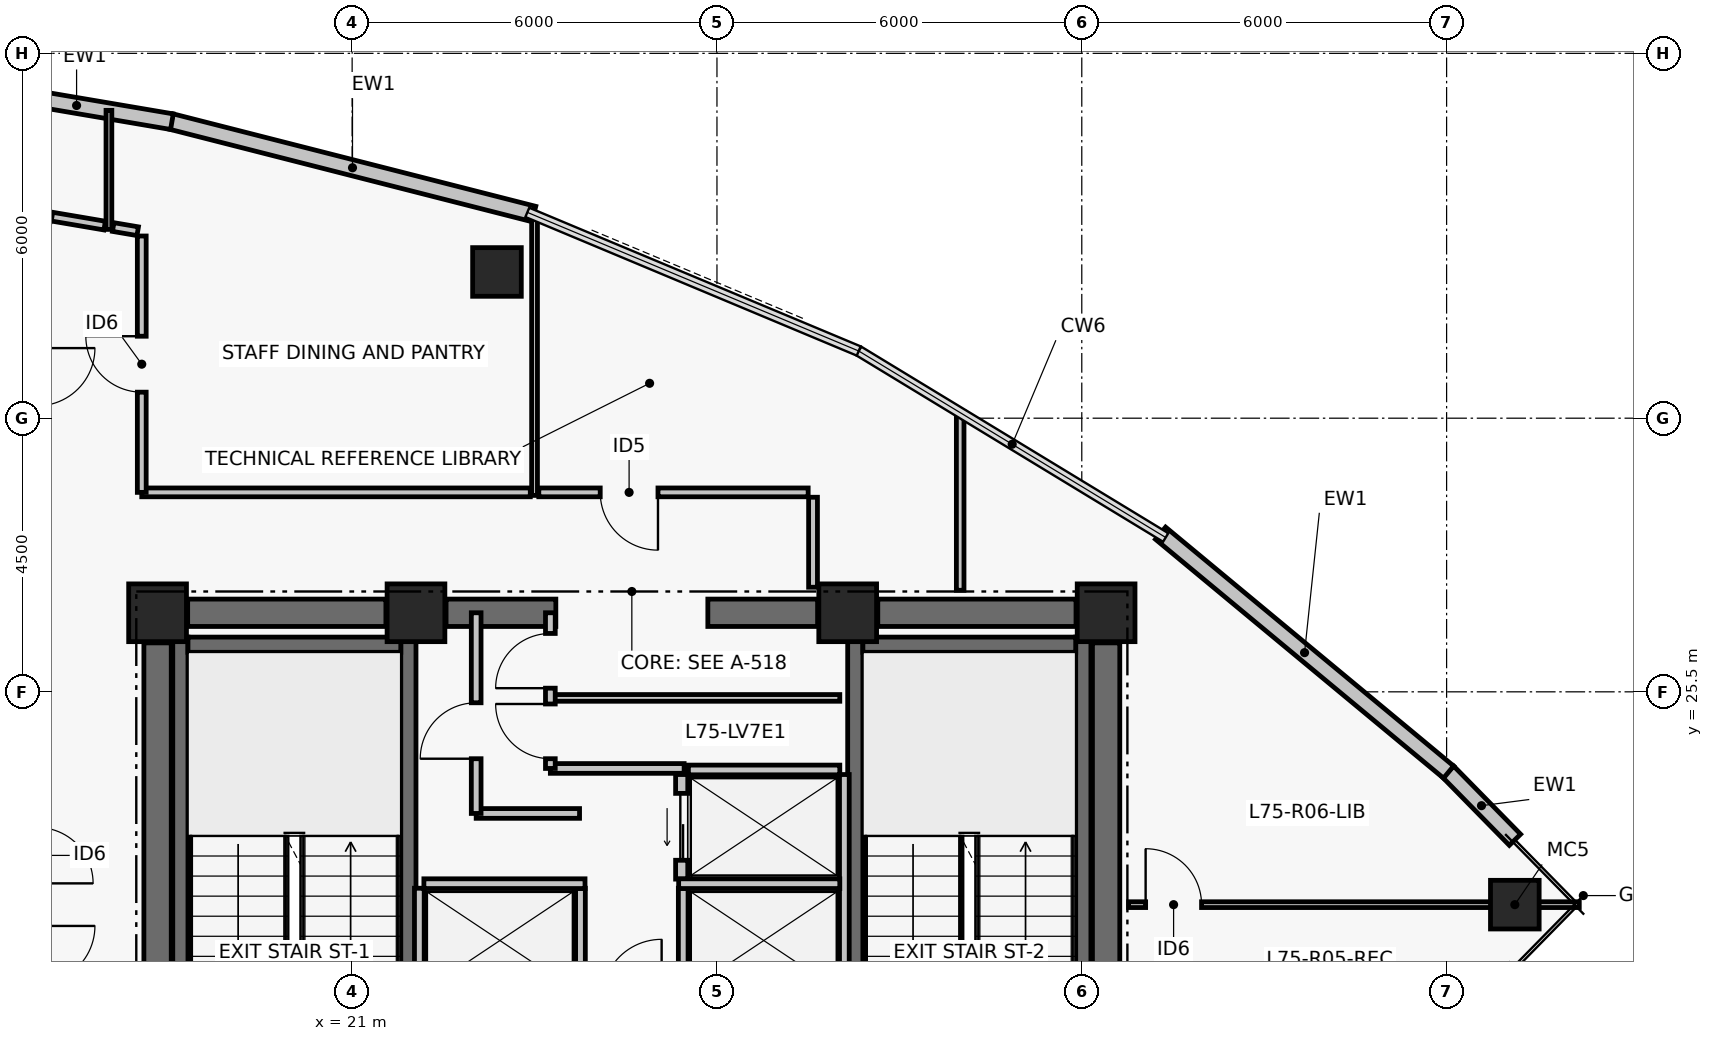
"""IFC4 building model, lengths in metres.
Left out: names, types, materials, properties, quantities, classifications, styles, units other than length and angle.
Written with IfcOpenShell. Run it as: python <this file> out.ifc"""

import sys

from ifc_helpers import new_model, si_unit, direction, frame, frame_2d, origin, origin_2d, place, context, subcontext, project, spatial, rectangle, hollow_rectangle, extrude, element, fill, save


model = new_model("IFC4")
c1 = context("Model", 3, precision=1e-05, world=origin(), true_north=direction((0.0, 1.0)))
c2 = subcontext(c1, "Body", "Model", "MODEL_VIEW")
j1 = project(units=[si_unit("LENGTHUNIT", "METRE"), si_unit("PLANEANGLEUNIT", "RADIAN")], contexts=[c1])
p1 = place(None, origin())
s1 = spatial("IfcSite", under=j1, at=p1, CompositionType="ELEMENT")
p2 = place(p1, origin())
s2 = spatial("IfcBuilding", under=s1, at=p2, CompositionType="ELEMENT")
p3 = place(p2, frame((0.0, 0.0, 295.5)))
s3 = spatial("IfcBuildingStorey", under=s2, at=p3, CompositionType="ELEMENT", Elevation=295.5)
for number, where, z_axis, x_axis in (
    (1, (17.8, 26.8, 0.0), (0.0, 0.0, 1.0), (1.0, 0.0, 0.0)),
    (2, (22.05, 26.8, 0.0), (0.0, 0.0, 1.0), (1.0, 0.0, 0.0)),
    (3, (29.15, 26.8, 0.0), (0.0, 0.0, 1.0), (1.0, 0.0, 0.0)),
    (4, (33.4, 26.8, 0.0), (0.0, 0.0, 1.0), (1.0, 0.0, 0.0)),
):
    element("IfcColumn", number, at=place(p3, frame(where, z_axis=z_axis, x_axis=x_axis)), inside=s3, PredefinedType="COLUMN", context=c2, shape_type="SweptSolid", body=[
        extrude(rectangle(XDim=0.95, YDim=0.95, at=origin_2d()), origin(), (0.0, 0.0, 1.0), 3.72),
    ])
p4 = place(p3, frame((18.295, 26.8, 0.0), z_axis=(0.0, 0.0, 1.0), x_axis=(1.0, 0.0, 0.0)))
e5 = element("IfcWall", 5, at=p4, inside=s3, PredefinedType="SHEAR", context=c2, shape_type="SweptSolid", body=[
    extrude(rectangle(XDim=3.26, YDim=0.45, at=frame_2d((1.63, 0.0))), origin(), (0.0, 0.0, 1.0), 3.44),
])
p5 = place(p3, frame((22.545, 26.8, 0.0), z_axis=(0.0, 0.0, 1.0), x_axis=(1.0, 0.0, 0.0)))
e6 = element("IfcWall", 6, at=p5, inside=s3, PredefinedType="SHEAR", context=c2, shape_type="SweptSolid", body=[
    extrude(rectangle(XDim=1.805, YDim=0.45, at=frame_2d((0.903, 0.0))), origin(), (0.0, 0.0, 1.0), 3.44),
])
p6 = place(p3, frame((26.85, 26.8, 0.0), z_axis=(0.0, 0.0, 1.0), x_axis=(1.0, 0.0, 0.0)))
e7 = element("IfcWall", 7, at=p6, inside=s3, PredefinedType="SHEAR", context=c2, shape_type="SweptSolid", body=[
    extrude(rectangle(XDim=1.805, YDim=0.45, at=frame_2d((0.902, 0.0))), origin(), (0.0, 0.0, 1.0), 3.44),
])
p7 = place(p3, frame((29.645, 26.8, 0.0), z_axis=(0.0, 0.0, 1.0), x_axis=(1.0, 0.0, 0.0)))
e8 = element("IfcWall", 8, at=p7, inside=s3, PredefinedType="SHEAR", context=c2, shape_type="SweptSolid", body=[
    extrude(rectangle(XDim=3.26, YDim=0.45, at=frame_2d((1.63, 0.0))), origin(), (0.0, 0.0, 1.0), 3.44),
])
for number, where, z_axis, x_axis in (
    (9, (17.8, 17.695, 0.0), (0.0, 0.0, 1.0), (0.0, 1.0, 0.0)),
    (10, (33.4, 17.695, 0.0), (0.0, 0.0, 1.0), (0.0, 1.0, 0.0)),
):
    element("IfcWall", number, at=place(p3, frame(where, z_axis=z_axis, x_axis=x_axis)), inside=s3, PredefinedType="SHEAR", context=c2, shape_type="SweptSolid", body=[
        extrude(rectangle(XDim=8.61, YDim=0.45, at=frame_2d((4.305, 0.0))), origin(), (0.0, 0.0, 1.0), 3.44),
    ])
p8 = place(p3, frame((18.175, 17.6, 0.0), z_axis=(0.0, 0.0, 1.0), x_axis=(0.0, 1.0, 0.0)))
e11 = element("IfcWall", 11, at=p8, inside=s3, PredefinedType="SHEAR", context=c2, shape_type="SweptSolid", body=[
    extrude(rectangle(XDim=8.8, YDim=0.25, at=frame_2d((4.4, 0.0))), origin(), (0.0, 0.0, 1.0), 3.44),
])
p9 = place(p3, frame((21.925, 17.6, 0.0), z_axis=(0.0, 0.0, 1.0), x_axis=(0.0, 1.0, 0.0)))
e12 = element("IfcWall", 12, at=p9, inside=s3, PredefinedType="SHEAR", context=c2, shape_type="SweptSolid", body=[
    extrude(rectangle(XDim=8.8, YDim=0.25, at=frame_2d((4.4, 0.0))), origin(), (0.0, 0.0, 1.0), 3.44),
])
p10 = place(p9, frame((0.35, 0.0, 0.0)))
e13 = element("IfcOpeningElement", 13, at=p10, cuts=e12, PredefinedType="OPENING", context=c2, shape_type="SweptSolid", body=[
    extrude(rectangle(XDim=1.05, YDim=2.08, at=frame_2d((0.525, 1.04))), frame((0.0, 0.135, 0.0), z_axis=(0.0, -1.0, 0.0), x_axis=(1.0, 0.0, 0.0)), (0.0, 0.0, 1.0), 0.27),
])
p11 = place(p3, frame((18.3, 26.275, 0.0), z_axis=(0.0, 0.0, 1.0), x_axis=(1.0, 0.0, 0.0)))
e14 = element("IfcWall", 14, at=p11, inside=s3, PredefinedType="SHEAR", context=c2, shape_type="SweptSolid", body=[
    extrude(rectangle(XDim=3.5, YDim=0.25, at=frame_2d((1.75, 0.0))), origin(), (0.0, 0.0, 1.0), 3.44),
])
p12 = place(p3, frame((29.275, 17.6, 0.0), z_axis=(0.0, 0.0, 1.0), x_axis=(0.0, 1.0, 0.0)))
e15 = element("IfcWall", 15, at=p12, inside=s3, PredefinedType="SHEAR", context=c2, shape_type="SweptSolid", body=[
    extrude(rectangle(XDim=8.8, YDim=0.25, at=frame_2d((4.4, 0.0))), origin(), (0.0, 0.0, 1.0), 3.44),
])
p13 = place(p12, frame((0.35, 0.0, 0.0)))
e16 = element("IfcOpeningElement", 16, at=p13, cuts=e15, PredefinedType="OPENING", context=c2, shape_type="SweptSolid", body=[
    extrude(rectangle(XDim=1.05, YDim=2.08, at=frame_2d((0.525, 1.04))), frame((0.0, 0.135, 0.0), z_axis=(0.0, -1.0, 0.0), x_axis=(1.0, 0.0, 0.0)), (0.0, 0.0, 1.0), 0.27),
])
p14 = place(p3, frame((33.025, 17.6, 0.0), z_axis=(0.0, 0.0, 1.0), x_axis=(0.0, 1.0, 0.0)))
e17 = element("IfcWall", 17, at=p14, inside=s3, PredefinedType="SHEAR", context=c2, shape_type="SweptSolid", body=[
    extrude(rectangle(XDim=8.8, YDim=0.25, at=frame_2d((4.4, 0.0))), origin(), (0.0, 0.0, 1.0), 3.44),
])
p15 = place(p3, frame((29.4, 26.275, 0.0), z_axis=(0.0, 0.0, 1.0), x_axis=(1.0, 0.0, 0.0)))
e18 = element("IfcWall", 18, at=p15, inside=s3, PredefinedType="SHEAR", context=c2, shape_type="SweptSolid", body=[
    extrude(rectangle(XDim=3.5, YDim=0.25, at=frame_2d((1.75, 0.0))), origin(), (0.0, 0.0, 1.0), 3.44),
])
for number, where, z_axis, x_axis in (
    (19, (40.122, 22.0, 0.0), (0.0, 0.0, 1.0), (1.0, 0.0, 0.0)),
    (20, (23.382, 32.405, 0.0), (0.0, 0.0, 1.0), (1.0, 0.0, 0.0)),
):
    element("IfcColumn", number, at=place(p3, frame(where, z_axis=z_axis, x_axis=x_axis)), inside=s3, PredefinedType="COLUMN", context=c2, shape_type="SweptSolid", body=[
        extrude(hollow_rectangle(XDim=0.8, YDim=0.8, WallThickness=0.035, at=origin_2d()), origin(), (0.0, 0.0, 1.0), 3.72),
    ])
p16 = place(p3, frame((39.024, 24.188, 0.0), z_axis=(0.0, 0.0, 1.0), x_axis=(0.700470648387, -0.71368121087, 0.0)))
e21 = element("IfcWall", 21, at=p16, inside=s3, PredefinedType="PARTITIONING", context=c2, shape_type="SweptSolid", body=[
    extrude(rectangle(XDim=1.571, YDim=0.26, at=frame_2d((0.785, 0.0))), origin(), (0.0, 0.0, 1.0), 3.44),
])
p17 = place(p3, frame((34.295, 28.108, 0.0), z_axis=(0.0, 0.0, 1.0), x_axis=(0.769779830138, -0.638309496337, 0.0)))
e22 = element("IfcWall", 22, at=p17, inside=s3, PredefinedType="PARTITIONING", context=c2, shape_type="SweptSolid", body=[
    extrude(rectangle(XDim=6.154, YDim=0.26, at=frame_2d((3.077, 0.0))), origin(), (0.0, 0.0, 1.0), 3.44),
])
p18 = place(p3, frame((18.024, 34.879, 0.0), z_axis=(0.0, 0.0, 1.0), x_axis=(0.968988278672, -0.247106689096, 0.0)))
e23 = element("IfcWall", 23, at=p18, inside=s3, PredefinedType="PARTITIONING", context=c2, shape_type="SweptSolid", body=[
    extrude(rectangle(XDim=6.154, YDim=0.26, at=frame_2d((3.077, 0.0))), origin(), (0.0, 0.0, 1.0), 3.44),
])
p19 = place(p3, frame((14.9, 35.409, 0.0), z_axis=(0.0, 0.0, 1.0), x_axis=(0.985889432766, -0.167397808709, 0.0)))
e24 = element("IfcWall", 24, at=p19, inside=s3, PredefinedType="PARTITIONING", context=c2, shape_type="SweptSolid", body=[
    extrude(rectangle(XDim=3.181, YDim=0.26, at=frame_2d((1.59, 0.0))), origin(), (0.0, 0.0, 1.0), 3.44),
])
p20 = place(p3, frame((26.42, 22.42, 0.0), z_axis=(0.0, 0.0, 1.0), x_axis=(0.0, 1.0, 0.0)))
e25 = element("IfcWall", 25, at=p20, inside=s3, PredefinedType="PARTITIONING", context=c2, shape_type="SweptSolid", body=[
    extrude(rectangle(XDim=1.72, YDim=0.2, at=frame_2d((0.86, 0.0))), origin(), (0.0, 0.0, 1.0), 3.44),
])
p21 = place(p20, frame((0.31, 0.0, 0.0)))
e26 = element("IfcOpeningElement", 26, at=p21, cuts=e25, PredefinedType="OPENING", context=c2, shape_type="SweptSolid", body=[
    extrude(rectangle(XDim=1.1, YDim=2.08, at=frame_2d((0.55, 1.04))), frame((0.0, 0.11, 0.0), z_axis=(0.0, -1.0, 0.0), x_axis=(1.0, 0.0, 0.0)), (0.0, 0.0, 1.0), 0.22),
])
for number, where, z_axis, x_axis in (
    (27, (22.105, 20.56, 0.0), (0.0, 0.0, 1.0), (0.0, 1.0, 0.0)),
    (28, (24.755, 20.56, 0.0), (0.0, 0.0, 1.0), (0.0, 1.0, 0.0)),
):
    element("IfcWall", number, at=place(p3, frame(where, z_axis=z_axis, x_axis=x_axis)), inside=s3, PredefinedType="PARTITIONING", context=c2, shape_type="SweptSolid", body=[
        extrude(rectangle(XDim=1.71, YDim=0.16, at=frame_2d((0.855, 0.0))), origin(), (0.0, 0.0, 1.0), 3.44),
    ])
p22 = place(p3, frame((22.18, 22.345, 0.0), z_axis=(0.0, 0.0, 1.0), x_axis=(1.0, 0.0, 0.0)))
e29 = element("IfcWall", 29, at=p22, inside=s3, PredefinedType="PARTITIONING", context=c2, shape_type="SweptSolid", body=[
    extrude(rectangle(XDim=2.65, YDim=0.16, at=frame_2d((1.325, 0.0))), origin(), (0.0, 0.0, 1.0), 3.44),
])
p23 = place(p3, frame((29.095, 20.56, 0.0), z_axis=(0.0, 0.0, 1.0), x_axis=(0.0, 1.0, 0.0)))
e30 = element("IfcWall", 30, at=p23, inside=s3, PredefinedType="PARTITIONING", context=c2, shape_type="SweptSolid", body=[
    extrude(rectangle(XDim=3.58, YDim=0.16, at=frame_2d((1.79, 0.0))), origin(), (0.0, 0.0, 1.0), 3.44),
])
p24 = place(p3, frame((26.445, 20.56, 0.0), z_axis=(0.0, 0.0, 1.0), x_axis=(0.0, 1.0, 0.0)))
e31 = element("IfcWall", 31, at=p24, inside=s3, PredefinedType="PARTITIONING", context=c2, shape_type="SweptSolid", body=[
    extrude(rectangle(XDim=1.71, YDim=0.16, at=frame_2d((0.855, 0.0))), origin(), (0.0, 0.0, 1.0), 3.44),
])
p25 = place(p3, frame((26.37, 22.345, 0.0), z_axis=(0.0, 0.0, 1.0), x_axis=(1.0, 0.0, 0.0)))
e32 = element("IfcWall", 32, at=p25, inside=s3, PredefinedType="PARTITIONING", context=c2, shape_type="SweptSolid", body=[
    extrude(rectangle(XDim=2.65, YDim=0.16, at=frame_2d((1.325, 0.0))), origin(), (0.0, 0.0, 1.0), 3.44),
])
p26 = place(p3, frame((26.53, 24.215, 0.0), z_axis=(0.0, 0.0, 1.0), x_axis=(1.0, 0.0, 0.0)))
e33 = element("IfcWall", 33, at=p26, inside=s3, PredefinedType="PARTITIONING", context=c2, shape_type="SweptSolid", body=[
    extrude(rectangle(XDim=2.49, YDim=0.16, at=frame_2d((1.245, 0.0))), origin(), (0.0, 0.0, 1.0), 3.44),
])
p27 = place(p3, frame((23.04, 23.5, 0.0), z_axis=(0.0, 0.0, 1.0), x_axis=(1.0, 0.0, 0.0)))
e34 = element("IfcWall", 34, at=p27, inside=s3, PredefinedType="PARTITIONING", context=c2, shape_type="SweptSolid", body=[
    extrude(rectangle(XDim=1.7, YDim=0.16, at=frame_2d((0.85, 0.0))), origin(), (0.0, 0.0, 1.0), 3.44),
])
p28 = place(p3, frame((23.04, 23.5, 0.0), z_axis=(0.0, 0.0, 1.0), x_axis=(0.0, 1.0, 0.0)))
e35 = element("IfcWall", 35, at=p28, inside=s3, PredefinedType="PARTITIONING", context=c2, shape_type="SweptSolid", body=[
    extrude(rectangle(XDim=3.3, YDim=0.16, at=frame_2d((1.65, 0.0))), origin(), (0.0, 0.0, 1.0), 2.57),
])
p29 = place(p28, frame((0.9, 0.0, 0.0)))
e36 = element("IfcOpeningElement", 36, at=p29, cuts=e35, PredefinedType="OPENING", context=c2, shape_type="SweptSolid", body=[
    extrude(rectangle(XDim=0.92, YDim=2.05, at=frame_2d((0.46, 1.025))), frame((0.0, 0.09, 0.0), z_axis=(0.0, -1.0, 0.0), x_axis=(1.0, 0.0, 0.0)), (0.0, 0.0, 1.0), 0.18),
])
p30 = place(p3, frame((24.26, 24.24, 0.0), z_axis=(0.0, 0.0, 1.0), x_axis=(1.0, 0.0, 0.0)))
e37 = element("IfcWall", 37, at=p30, inside=s3, PredefinedType="PARTITIONING", context=c2, shape_type="SweptSolid", body=[
    extrude(rectangle(XDim=2.2, YDim=0.16, at=frame_2d((1.1, 0.0))), origin(), (0.0, 0.0, 1.0), 3.44),
])
p31 = place(p3, frame((24.26, 25.4, 0.0), z_axis=(0.0, 0.0, 1.0), x_axis=(1.0, 0.0, 0.0)))
e38 = element("IfcWall", 38, at=p31, inside=s3, PredefinedType="PARTITIONING", context=c2, shape_type="SweptSolid", body=[
    extrude(rectangle(XDim=4.76, YDim=0.11, at=frame_2d((2.38, 0.0))), origin(), (0.0, 0.0, 1.0), 3.44),
])
p32 = place(p3, frame((24.26, 24.24, 0.0), z_axis=(0.0, 0.0, 1.0), x_axis=(0.0, 1.0, 0.0)))
e39 = element("IfcWall", 39, at=p32, inside=s3, PredefinedType="PARTITIONING", context=c2, shape_type="SweptSolid", body=[
    extrude(rectangle(XDim=2.56, YDim=0.16, at=frame_2d((1.28, 0.0))), origin(), (0.0, 0.0, 1.0), 2.57),
])
p33 = place(p32, frame((0.16, 0.0, 0.0)))
e40 = element("IfcOpeningElement", 40, at=p33, cuts=e39, PredefinedType="OPENING", context=c2, shape_type="SweptSolid", body=[
    extrude(rectangle(XDim=0.9, YDim=2.02, at=frame_2d((0.45, 1.01))), frame((0.0, 0.09, 0.0), z_axis=(0.0, -1.0, 0.0), x_axis=(1.0, 0.0, 0.0)), (0.0, 0.0, 1.0), 0.18),
])
p34 = place(p32, frame((1.32, 0.0, 0.0)))
e41 = element("IfcOpeningElement", 41, at=p34, cuts=e39, PredefinedType="OPENING", context=c2, shape_type="SweptSolid", body=[
    extrude(rectangle(XDim=0.9, YDim=2.02, at=frame_2d((0.45, 1.01))), frame((0.0, 0.09, 0.0), z_axis=(0.0, -1.0, 0.0), x_axis=(1.0, 0.0, 0.0)), (0.0, 0.0, 1.0), 0.18),
])
p35 = place(p3, frame((28.58, 27.22, 0.0), z_axis=(0.0, 0.0, 1.0), x_axis=(0.0, 1.0, 0.0)))
e42 = element("IfcWall", 42, at=p35, inside=s3, PredefinedType="PARTITIONING", context=c2, shape_type="SweptSolid", body=[
    extrude(rectangle(XDim=1.48, YDim=0.145, at=frame_2d((0.74, 0.0))), origin(), (0.0, 0.0, 1.0), 2.57),
])
p36 = place(p3, frame((28.5, 28.78, 0.0), z_axis=(0.0, 0.0, 1.0), x_axis=(-1.0, 0.0, 0.0)))
e43 = element("IfcWall", 43, at=p36, inside=s3, PredefinedType="PARTITIONING", context=c2, shape_type="SweptSolid", body=[
    extrude(rectangle(XDim=4.43, YDim=0.145, at=frame_2d((2.215, 0.0))), origin(), (0.0, 0.0, 1.0), 3.44),
])
p37 = place(p36, frame((2.47, 0.0, 0.0)))
e44 = element("IfcOpeningElement", 44, at=p37, cuts=e43, PredefinedType="OPENING", context=c2, shape_type="SweptSolid", body=[
    extrude(rectangle(XDim=0.95, YDim=2.06, at=frame_2d((0.475, 1.03))), frame((0.0, 0.083, 0.0), z_axis=(0.0, -1.0, 0.0), x_axis=(1.0, 0.0, 0.0)), (0.0, 0.0, 1.0), 0.165),
])
p38 = place(p3, frame((23.93, 28.78, 0.0), z_axis=(0.0, 0.0, 1.0), x_axis=(-1.0, 0.0, 0.0)))
e45 = element("IfcWall", 45, at=p38, inside=s3, PredefinedType="PARTITIONING", context=c2, shape_type="SweptSolid", body=[
    extrude(rectangle(XDim=6.39, YDim=0.145, at=frame_2d((3.195, 0.0))), origin(), (0.0, 0.0, 1.0), 2.17),
])
p39 = place(p3, frame((17.54, 28.78, 0.0), z_axis=(0.0, 0.0, 1.0), x_axis=(0.0, 1.0, 0.0)))
e46 = element("IfcWall", 46, at=p39, inside=s3, PredefinedType="PARTITIONING", context=c2, shape_type="SweptSolid", body=[
    extrude(rectangle(XDim=4.216, YDim=0.145, at=frame_2d((2.108, 0.0))), origin(), (0.0, 0.0, 1.0), 2.17),
])
p40 = place(p39, frame((1.648, 0.0, 0.0)))
e47 = element("IfcOpeningElement", 47, at=p40, cuts=e46, PredefinedType="OPENING", context=c2, shape_type="SweptSolid", body=[
    extrude(rectangle(XDim=0.92, YDim=2.05, at=frame_2d((0.46, 1.025))), frame((0.0, 0.083, 0.0), z_axis=(0.0, -1.0, 0.0), x_axis=(1.0, 0.0, 0.0)), (0.0, 0.0, 1.0), 0.165),
])
p41 = place(p3, frame((17.473, 33.075, 0.0), z_axis=(0.0, 0.0, 1.0), x_axis=(-0.985840066474, 0.167688292179, 0.0)))
e48 = element("IfcWall", 48, at=p41, inside=s3, PredefinedType="PARTITIONING", context=c2, shape_type="SweptSolid", body=[
    extrude(rectangle(XDim=0.409, YDim=0.145, at=frame_2d((0.205, 0.0))), origin(), (0.0, 0.0, 1.0), 3.44),
])
p42 = place(p3, frame((16.93, 33.167, 0.0), z_axis=(0.0, 0.0, 1.0), x_axis=(-0.985878779942, 0.167460536424, 0.0)))
e49 = element("IfcWall", 49, at=p42, inside=s3, PredefinedType="PARTITIONING", context=c2, shape_type="SweptSolid", body=[
    extrude(rectangle(XDim=0.879, YDim=0.145, at=frame_2d((0.439, 0.0))), origin(), (0.0, 0.0, 1.0), 2.17),
])
p43 = place(p3, frame((17.0, 33.104, 0.0), z_axis=(0.0, 0.0, 1.0), x_axis=(0.0, 1.0, 0.0)))
e50 = element("IfcWall", 50, at=p43, inside=s3, PredefinedType="PARTITIONING", context=c2, shape_type="SweptSolid", body=[
    extrude(rectangle(XDim=1.958, YDim=0.095, at=frame_2d((0.979, 0.0))), origin(), (0.0, 0.0, 1.0), 2.92),
])
p44 = place(p3, frame((24.0, 28.73, 0.0), z_axis=(0.0, 0.0, 1.0), x_axis=(0.0, 1.0, 0.0)))
e51 = element("IfcWall", 51, at=p44, inside=s3, PredefinedType="PARTITIONING", context=c2, shape_type="SweptSolid", body=[
    extrude(rectangle(XDim=4.616, YDim=0.095, at=frame_2d((2.308, 0.0))), origin(), (0.0, 0.0, 1.0), 2.92),
])
p45 = place(p3, frame((31.0, 27.17, 0.0), z_axis=(0.0, 0.0, 1.0), x_axis=(0.0, 1.0, 0.0)))
e52 = element("IfcWall", 52, at=p45, inside=s3, PredefinedType="PARTITIONING", context=c2, shape_type="SweptSolid", body=[
    extrude(rectangle(XDim=2.933, YDim=0.125, at=frame_2d((1.467, 0.0))), origin(), (0.0, 0.0, 1.0), 2.57),
])
p46 = place(p3, frame((33.77, 22.0, 0.0), z_axis=(0.0, 0.0, 1.0), x_axis=(1.0, 0.0, 0.0)))
e53 = element("IfcWall", 53, at=p46, inside=s3, PredefinedType="PARTITIONING", context=c2, shape_type="SweptSolid", body=[
    extrude(rectangle(XDim=7.412, YDim=0.095, at=frame_2d((3.706, 0.0))), origin(), (0.0, 0.0, 1.0), 2.17),
])
p47 = place(p46, frame((0.28, 0.0, 0.0)))
e54 = element("IfcOpeningElement", 54, at=p47, cuts=e53, PredefinedType="OPENING", context=c2, shape_type="SweptSolid", body=[
    extrude(rectangle(XDim=0.92, YDim=2.05, at=frame_2d((0.46, 1.025))), frame((0.0, 0.057, 0.0), z_axis=(0.0, -1.0, 0.0), x_axis=(1.0, 0.0, 0.0)), (0.0, 0.0, 1.0), 0.115),
])
p48 = place(p21, origin())
e55 = element("IfcDoor", 55, at=p48, inside=s3, OperationType="DOUBLE_DOOR_SLIDING", PredefinedType="DOOR", context=c2, shape_type="SweptSolid", body=[
    extrude(rectangle(XDim=1.1, YDim=2.08, at=frame_2d((0.55, 1.04))), frame((0.0, 0.025, 0.0), z_axis=(0.0, -1.0, 0.0), x_axis=(1.0, 0.0, 0.0)), (0.0, 0.0, 1.0), 0.05),
])
fill(e26, e55)
p49 = place(p29, origin())
e56 = element("IfcDoor", 56, at=p49, inside=s3, OperationType="SINGLE_SWING_LEFT", PredefinedType="DOOR", context=c2, shape_type="SweptSolid", body=[
    extrude(rectangle(XDim=0.92, YDim=2.05, at=frame_2d((0.46, 1.025))), frame((0.0, 0.025, 0.0), z_axis=(0.0, -1.0, 0.0), x_axis=(1.0, 0.0, 0.0)), (0.0, 0.0, 1.0), 0.05),
])
fill(e36, e56)
p50 = place(p33, origin())
e57 = element("IfcDoor", 57, at=p50, inside=s3, OperationType="SINGLE_SWING_RIGHT", PredefinedType="DOOR", context=c2, shape_type="SweptSolid", body=[
    extrude(rectangle(XDim=0.9, YDim=2.02, at=frame_2d((0.45, 1.01))), frame((0.0, 0.025, 0.0), z_axis=(0.0, -1.0, 0.0), x_axis=(1.0, 0.0, 0.0)), (0.0, 0.0, 1.0), 0.05),
])
fill(e40, e57)
p51 = place(p34, origin())
e58 = element("IfcDoor", 58, at=p51, inside=s3, OperationType="SINGLE_SWING_LEFT", PredefinedType="DOOR", context=c2, shape_type="SweptSolid", body=[
    extrude(rectangle(XDim=0.9, YDim=2.02, at=frame_2d((0.45, 1.01))), frame((0.0, 0.025, 0.0), z_axis=(0.0, -1.0, 0.0), x_axis=(1.0, 0.0, 0.0)), (0.0, 0.0, 1.0), 0.05),
])
fill(e41, e58)
p52 = place(p37, origin())
e59 = element("IfcDoor", 59, at=p52, inside=s3, OperationType="SINGLE_SWING_LEFT", PredefinedType="DOOR", context=c2, shape_type="SweptSolid", body=[
    extrude(rectangle(XDim=0.95, YDim=2.06, at=frame_2d((0.475, 1.03))), frame((0.0, 0.025, 0.0), z_axis=(0.0, -1.0, 0.0), x_axis=(1.0, 0.0, 0.0)), (0.0, 0.0, 1.0), 0.05),
])
fill(e44, e59)
p53 = place(p40, origin())
e60 = element("IfcDoor", 60, at=p53, inside=s3, OperationType="SINGLE_SWING_RIGHT", PredefinedType="DOOR", context=c2, shape_type="SweptSolid", body=[
    extrude(rectangle(XDim=0.92, YDim=2.05, at=frame_2d((0.46, 1.025))), frame((0.0, 0.025, 0.0), z_axis=(0.0, -1.0, 0.0), x_axis=(1.0, 0.0, 0.0)), (0.0, 0.0, 1.0), 0.05),
])
fill(e47, e60)
p54 = place(p47, origin())
e61 = element("IfcDoor", 61, at=p54, inside=s3, OperationType="SINGLE_SWING_LEFT", PredefinedType="DOOR", context=c2, shape_type="SweptSolid", body=[
    extrude(rectangle(XDim=0.92, YDim=2.05, at=frame_2d((0.46, 1.025))), frame((0.0, 0.025, 0.0), z_axis=(0.0, -1.0, 0.0), x_axis=(1.0, 0.0, 0.0)), (0.0, 0.0, 1.0), 0.05),
])
fill(e54, e61)
save(model, sys.argv[1])
